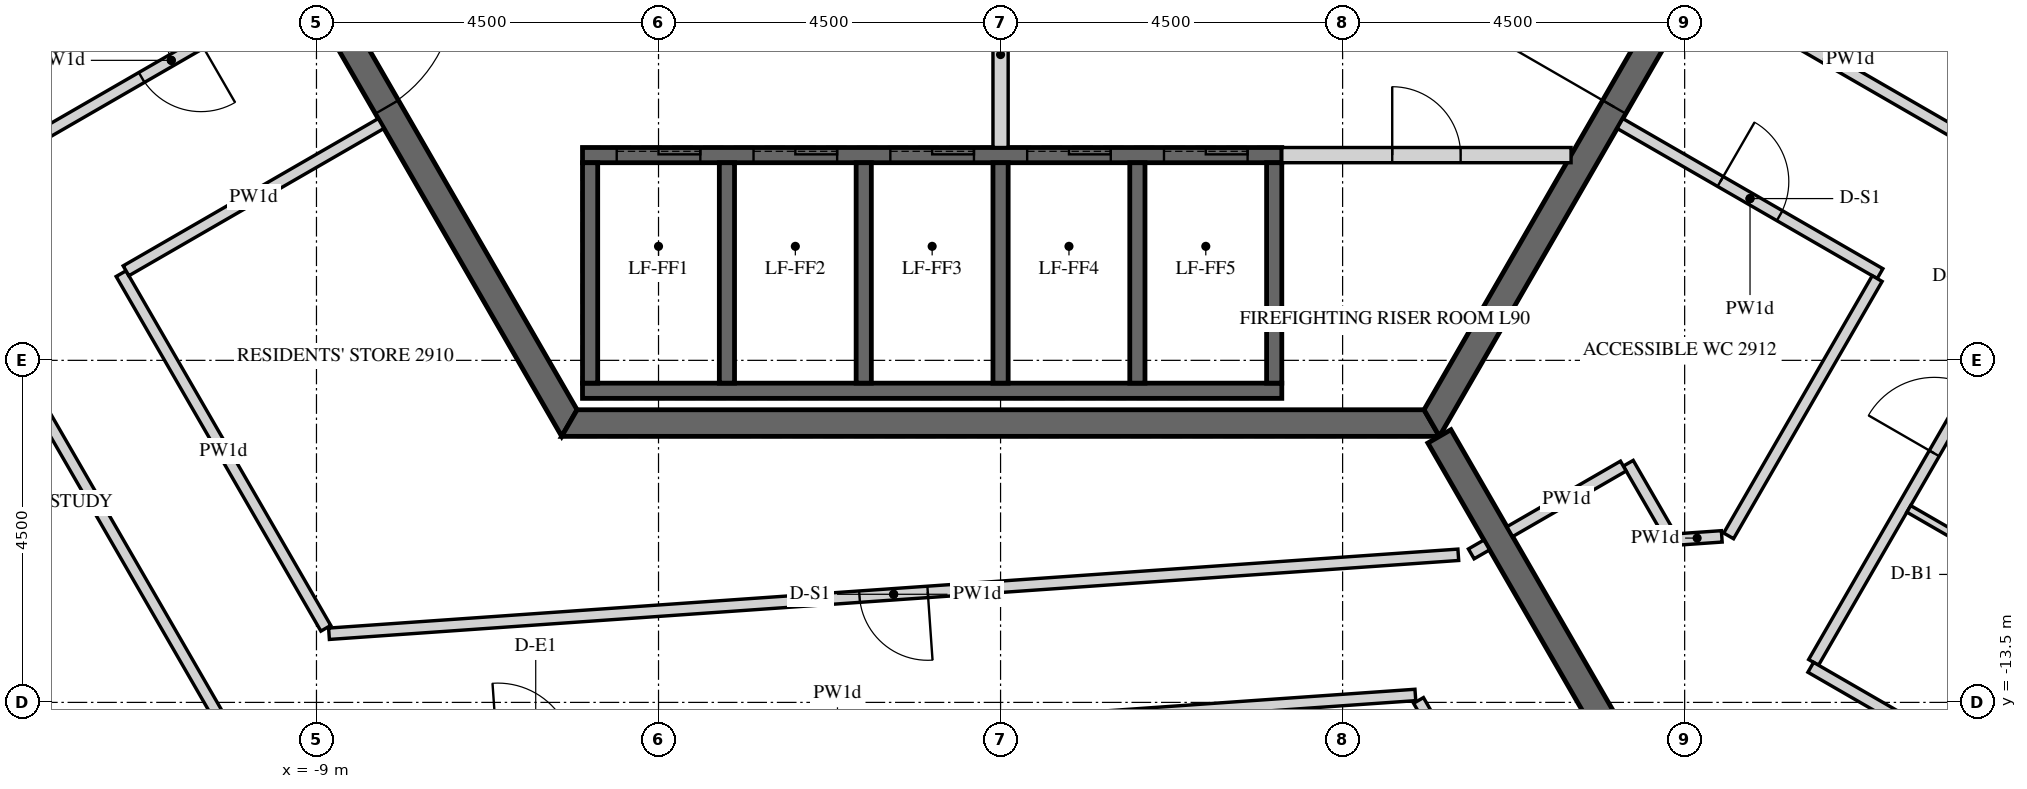
"""IFC4 building model, lengths in metres.
Left out: names, types, materials, properties, quantities, classifications, styles, units other than length and angle.
Written with IfcOpenShell. Run it as: python <this file> out.ifc"""

import sys

from ifc_helpers import new_model, si_unit, direction, frame, frame_2d, origin, place, context, subcontext, project, spatial, polyline, rectangle, outline, extrude, element, fill, save


model = new_model("IFC4")
c1 = context("Model", 3, precision=1e-05, world=origin(), true_north=direction((0.0, 1.0)))
c2 = subcontext(c1, "Body", "Model", "MODEL_VIEW")
j1 = project(units=[si_unit("LENGTHUNIT", "METRE"), si_unit("PLANEANGLEUNIT", "RADIAN")], contexts=[c1])
p1 = place(None, origin())
s1 = spatial("IfcSite", under=j1, at=p1, CompositionType="ELEMENT")
p2 = place(p1, origin())
s2 = spatial("IfcBuilding", under=s1, at=p2, CompositionType="ELEMENT")
p3 = place(p2, frame((0.0, 0.0, 372.9)))
s3 = spatial("IfcBuildingStorey", under=s2, at=p3, CompositionType="ELEMENT", Elevation=372.9)
p4 = place(p3, frame((-11.345, 0.0, -0.15), z_axis=(0.0, 0.0, 1.0), x_axis=(0.499995046907, -0.866028263435, 0.0)))
e1 = element("IfcWall", 1, at=p4, inside=s3, PredefinedType="SHEAR", context=c2, shape_type="SweptSolid", body=[
    extrude(outline(polyline([(-0.101, -0.175), (11.446, -0.175), (11.244, 0.175), (0.101, 0.175), (-0.101, -0.175)])), origin(), (0.0, 0.0, 1.0), 3.55),
])
p5 = place(p4, frame((4.744, 0.0, 0.15)))
e2 = element("IfcOpeningElement", 2, at=p5, cuts=e1, PredefinedType="OPENING", context=c2, shape_type="SweptSolid", body=[
    extrude(rectangle(XDim=1.8, YDim=2.4, at=frame_2d((0.9, 1.2))), frame((0.0, 0.185, 0.0), z_axis=(0.0, -1.0, 0.0), x_axis=(1.0, 0.0, 0.0)), (0.0, 0.0, 1.0), 0.37),
])
p6 = place(p3, frame((-5.673, -9.825, -0.15), z_axis=(0.0, 0.0, 1.0), x_axis=(1.0, 0.0, 0.0)))
e3 = element("IfcWall", 3, at=p6, inside=s3, PredefinedType="SHEAR", context=c2, shape_type="SweptSolid", body=[
    extrude(outline(polyline([(-0.101, -0.175), (11.446, -0.175), (11.244, 0.175), (0.101, 0.175), (-0.101, -0.175)])), origin(), (0.0, 0.0, 1.0), 3.55),
])
p7 = place(p3, frame((5.673, -9.825, -0.15), z_axis=(0.0, 0.0, 1.0), x_axis=(0.499995046907, 0.866028263435, 0.0)))
e4 = element("IfcWall", 4, at=p7, inside=s3, PredefinedType="SHEAR", context=c2, shape_type="SweptSolid", body=[
    extrude(outline(polyline([(-0.101, -0.175), (11.446, -0.175), (11.244, 0.175), (0.101, 0.175), (-0.101, -0.175)])), origin(), (0.0, 0.0, 1.0), 3.55),
])
p8 = place(p7, frame((4.801, 0.0, 0.15)))
e5 = element("IfcOpeningElement", 5, at=p8, cuts=e4, PredefinedType="OPENING", context=c2, shape_type="SweptSolid", body=[
    extrude(rectangle(XDim=1.8, YDim=2.4, at=frame_2d((0.9, 1.2))), frame((0.0, 0.185, 0.0), z_axis=(0.0, -1.0, 0.0), x_axis=(1.0, 0.0, 0.0)), (0.0, 0.0, 1.0), 0.37),
])
p9 = place(p3, frame((5.773, -10.0, -0.15), z_axis=(0.0, 0.0, 1.0), x_axis=(0.500007911273, -0.866020836161, 0.0)))
e6 = element("IfcWall", 6, at=p9, inside=s3, PredefinedType="SHEAR", context=c2, shape_type="SweptSolid", body=[
    extrude(rectangle(XDim=14.51, YDim=0.35, at=frame_2d((7.255, 0.0))), origin(), (0.0, 0.0, 1.0), 3.55),
])
p10 = place(p9, frame((6.355, 0.0, 0.15)))
e7 = element("IfcOpeningElement", 7, at=p10, cuts=e6, PredefinedType="OPENING", context=c2, shape_type="SweptSolid", body=[
    extrude(rectangle(XDim=1.8, YDim=2.4, at=frame_2d((0.9, 1.2))), frame((0.0, 0.185, 0.0), z_axis=(0.0, -1.0, 0.0), x_axis=(1.0, 0.0, 0.0)), (0.0, 0.0, 1.0), 0.37),
])
p11 = place(p3, frame((-5.5, -6.3, -0.25), z_axis=(0.0, 0.0, 1.0), x_axis=(1.0, 0.0, 0.0)))
e8 = element("IfcWall", 8, at=p11, inside=s3, PredefinedType="SHEAR", context=c2, shape_type="SweptSolid", body=[
    extrude(rectangle(XDim=9.2, YDim=0.2, at=frame_2d((4.6, 0.0))), origin(), (0.0, 0.0, 1.0), 3.9),
])
p12 = place(p11, frame((0.45, 0.0, 0.25)))
e9 = element("IfcOpeningElement", 9, at=p12, cuts=e8, PredefinedType="OPENING", context=c2, shape_type="SweptSolid", body=[
    extrude(rectangle(XDim=1.1, YDim=2.1, at=frame_2d((0.55, 1.05))), frame((0.0, 0.11, 0.0), z_axis=(0.0, -1.0, 0.0), x_axis=(1.0, 0.0, 0.0)), (0.0, 0.0, 1.0), 0.22),
])
p13 = place(p11, frame((2.25, 0.0, 0.25)))
e10 = element("IfcOpeningElement", 10, at=p13, cuts=e8, PredefinedType="OPENING", context=c2, shape_type="SweptSolid", body=[
    extrude(rectangle(XDim=1.1, YDim=2.1, at=frame_2d((0.55, 1.05))), frame((0.0, 0.11, 0.0), z_axis=(0.0, -1.0, 0.0), x_axis=(1.0, 0.0, 0.0)), (0.0, 0.0, 1.0), 0.22),
])
p14 = place(p11, frame((4.05, 0.0, 0.25)))
e11 = element("IfcOpeningElement", 11, at=p14, cuts=e8, PredefinedType="OPENING", context=c2, shape_type="SweptSolid", body=[
    extrude(rectangle(XDim=1.1, YDim=2.1, at=frame_2d((0.55, 1.05))), frame((0.0, 0.11, 0.0), z_axis=(0.0, -1.0, 0.0), x_axis=(1.0, 0.0, 0.0)), (0.0, 0.0, 1.0), 0.22),
])
p15 = place(p11, frame((5.85, 0.0, 0.25)))
e12 = element("IfcOpeningElement", 12, at=p15, cuts=e8, PredefinedType="OPENING", context=c2, shape_type="SweptSolid", body=[
    extrude(rectangle(XDim=1.1, YDim=2.1, at=frame_2d((0.55, 1.05))), frame((0.0, 0.11, 0.0), z_axis=(0.0, -1.0, 0.0), x_axis=(1.0, 0.0, 0.0)), (0.0, 0.0, 1.0), 0.22),
])
p16 = place(p11, frame((7.65, 0.0, 0.25)))
e13 = element("IfcOpeningElement", 13, at=p16, cuts=e8, PredefinedType="OPENING", context=c2, shape_type="SweptSolid", body=[
    extrude(rectangle(XDim=1.1, YDim=2.1, at=frame_2d((0.55, 1.05))), frame((0.0, 0.11, 0.0), z_axis=(0.0, -1.0, 0.0), x_axis=(1.0, 0.0, 0.0)), (0.0, 0.0, 1.0), 0.22),
])
p17 = place(p3, frame((-5.5, -9.4, -0.25), z_axis=(0.0, 0.0, 1.0), x_axis=(1.0, 0.0, 0.0)))
e14 = element("IfcWall", 14, at=p17, inside=s3, PredefinedType="SHEAR", context=c2, shape_type="SweptSolid", body=[
    extrude(rectangle(XDim=9.2, YDim=0.2, at=frame_2d((4.6, 0.0))), origin(), (0.0, 0.0, 1.0), 3.9),
])
for number, where, z_axis, x_axis in (
    (15, (-5.4, -9.3, -0.25), (0.0, 0.0, 1.0), (0.0, 1.0, 0.0)),
    (16, (-3.6, -9.3, -0.25), (0.0, 0.0, 1.0), (0.0, 1.0, 0.0)),
    (17, (-1.8, -9.3, -0.25), (0.0, 0.0, 1.0), (0.0, 1.0, 0.0)),
    (18, (0.0, -9.3, -0.25), (0.0, 0.0, 1.0), (0.0, 1.0, 0.0)),
    (19, (1.8, -9.3, -0.25), (0.0, 0.0, 1.0), (0.0, 1.0, 0.0)),
    (20, (3.6, -9.3, -0.25), (0.0, 0.0, 1.0), (0.0, 1.0, 0.0)),
):
    element("IfcWall", number, at=place(p3, frame(where, z_axis=z_axis, x_axis=x_axis)), inside=s3, PredefinedType="SHEAR", context=c2, shape_type="SweptSolid", body=[
        extrude(rectangle(XDim=2.9, YDim=0.2, at=frame_2d((1.45, 0.0))), origin(), (0.0, 0.0, 1.0), 3.9),
    ])
p18 = place(p3, frame((0.0, -6.2, 0.0), z_axis=(0.0, 0.0, 1.0), x_axis=(0.0, 1.0, 0.0)))
e21 = element("IfcWall", 21, at=p18, inside=s3, PredefinedType="PARTITIONING", context=c2, shape_type="SweptSolid", body=[
    extrude(rectangle(XDim=6.1, YDim=0.2, at=frame_2d((3.05, 0.0))), origin(), (0.0, 0.0, 1.0), 3.65),
])
p19 = place(p3, frame((3.7, -6.3, 0.0), z_axis=(0.0, 0.0, 1.0), x_axis=(1.0, 0.0, 0.0)))
e22 = element("IfcWall", 22, at=p19, inside=s3, PredefinedType="PARTITIONING", context=c2, shape_type="SweptSolid", body=[
    extrude(rectangle(XDim=3.806, YDim=0.2, at=frame_2d((1.903, 0.0))), origin(), (0.0, 0.0, 1.0), 3.65),
])
p20 = place(p19, frame((1.453, 0.0, 0.0)))
e23 = element("IfcOpeningElement", 23, at=p20, cuts=e22, PredefinedType="OPENING", context=c2, shape_type="SweptSolid", body=[
    extrude(rectangle(XDim=0.9, YDim=2.1, at=frame_2d((0.45, 1.05))), frame((0.0, 0.11, 0.0), z_axis=(0.0, -1.0, 0.0), x_axis=(1.0, 0.0, 0.0)), (0.0, 0.0, 1.0), 0.22),
])
p21 = place(p3, frame((-16.583, -2.777, 0.0), z_axis=(0.0, 0.0, 1.0), x_axis=(0.50000467473, -0.866022704811, 0.0)))
e24 = element("IfcWall", 24, at=p21, inside=s3, PredefinedType="PARTITIONING", context=c2, shape_type="SweptSolid", body=[
    extrude(rectangle(XDim=13.504, YDim=0.15, at=frame_2d((6.752, 0.0))), origin(), (0.0, 0.0, 1.0), 2.47),
])
p22 = place(p21, frame((0.925, 0.0, 0.0)))
e25 = element("IfcOpeningElement", 25, at=p22, cuts=e24, PredefinedType="OPENING", context=c2, shape_type="SweptSolid", body=[
    extrude(rectangle(XDim=1.0, YDim=2.1, at=frame_2d((0.5, 1.05))), frame((0.0, 0.085, 0.0), z_axis=(0.0, -1.0, 0.0), x_axis=(1.0, 0.0, 0.0)), (0.0, 0.0, 1.0), 0.17),
])
p23 = place(p3, frame((-9.749, -14.465, 0.0), z_axis=(0.0, 0.0, 1.0), x_axis=(0.997564252773, 0.069753577612, 0.0)))
e26 = element("IfcWall", 26, at=p23, inside=s3, PredefinedType="PARTITIONING", context=c2, shape_type="SweptSolid", body=[
    extrude(rectangle(XDim=15.243, YDim=0.15, at=frame_2d((7.621, 0.0))), origin(), (0.0, 0.0, 1.0), 2.47),
])
p24 = place(p23, frame((3.142, 0.0, 0.0)))
e27 = element("IfcOpeningElement", 27, at=p24, cuts=e26, PredefinedType="OPENING", context=c2, shape_type="SweptSolid", body=[
    extrude(rectangle(XDim=1.0, YDim=2.1, at=frame_2d((0.5, 1.05))), frame((0.0, 0.085, 0.0), z_axis=(0.0, -1.0, 0.0), x_axis=(1.0, 0.0, 0.0)), (0.0, 0.0, 1.0), 0.17),
])
p25 = place(p3, frame((5.499, -13.474, 0.0), z_axis=(0.0, 0.0, 1.0), x_axis=(0.500002592159, -0.866023907196, 0.0)))
e28 = element("IfcWall", 28, at=p25, inside=s3, PredefinedType="PARTITIONING", context=c2, shape_type="SweptSolid", body=[
    extrude(rectangle(XDim=5.784, YDim=0.15, at=frame_2d((2.892, 0.0))), origin(), (0.0, 0.0, 1.0), 2.47),
])
p26 = place(p3, frame((-9.2, -4.066, 0.0), z_axis=(0.0, 0.0, 1.0), x_axis=(-0.866020906874, -0.500007788796, 0.0)))
e29 = element("IfcWall", 29, at=p26, inside=s3, PredefinedType="PARTITIONING", context=c2, shape_type="SweptSolid", body=[
    extrude(rectangle(XDim=3.95, YDim=0.15, at=frame_2d((1.975, 0.0))), origin(), (0.0, 0.0, 1.0), 2.47),
])
p27 = place(p26, frame((1.525, 0.0, 0.0)))
e30 = element("IfcOpeningElement", 30, at=p27, cuts=e29, PredefinedType="OPENING", context=c2, shape_type="SweptSolid", body=[
    extrude(rectangle(XDim=0.9, YDim=2.1, at=frame_2d((0.45, 1.05))), frame((0.0, 0.085, 0.0), z_axis=(0.0, -1.0, 0.0), x_axis=(1.0, 0.0, 0.0)), (0.0, 0.0, 1.0), 0.17),
])
p28 = place(p3, frame((6.396, -11.429, 0.0), z_axis=(0.0, 0.0, 1.0), x_axis=(-0.866254745882, -0.499602557277, 0.0)))
e31 = element("IfcWall", 31, at=p28, inside=s3, PredefinedType="PARTITIONING", context=c2, shape_type="SweptSolid", body=[
    extrude(rectangle(XDim=0.235, YDim=0.15, at=frame_2d((0.118, 0.0))), origin(), (0.0, 0.0, 1.0), 2.47),
])
p29 = place(p3, frame((6.022, -11.558, 0.0), z_axis=(0.0, 0.0, 1.0), x_axis=(-0.997564502115, -0.06975001161, 0.0)))
e32 = element("IfcWall", 32, at=p29, inside=s3, PredefinedType="PARTITIONING", context=c2, shape_type="SweptSolid", body=[
    extrude(rectangle(XDim=14.894, YDim=0.15, at=frame_2d((7.447, 0.0))), origin(), (0.0, 0.0, 1.0), 2.47),
])
p30 = place(p29, frame((6.997, 0.0, 0.0)))
e33 = element("IfcOpeningElement", 33, at=p30, cuts=e32, PredefinedType="OPENING", context=c2, shape_type="SweptSolid", body=[
    extrude(rectangle(XDim=0.9, YDim=2.1, at=frame_2d((0.45, 1.05))), frame((0.0, 0.085, 0.0), z_axis=(0.0, -1.0, 0.0), x_axis=(1.0, 0.0, 0.0)), (0.0, 0.0, 1.0), 0.17),
])
p31 = place(p3, frame((-8.877, -12.525, 0.0), z_axis=(0.0, 0.0, 1.0), x_axis=(-0.500014061761, 0.866017285071, 0.0)))
e34 = element("IfcWall", 34, at=p31, inside=s3, PredefinedType="PARTITIONING", context=c2, shape_type="SweptSolid", body=[
    extrude(rectangle(XDim=5.387, YDim=0.15, at=frame_2d((2.693, 0.0))), origin(), (0.0, 0.0, 1.0), 2.47),
])
p32 = place(p3, frame((-11.506, -7.822, 0.0), z_axis=(0.0, 0.0, 1.0), x_axis=(0.866032409438, 0.499987865656, 0.0)))
e35 = element("IfcWall", 35, at=p32, inside=s3, PredefinedType="PARTITIONING", context=c2, shape_type="SweptSolid", body=[
    extrude(rectangle(XDim=3.875, YDim=0.15, at=frame_2d((1.938, 0.0))), origin(), (0.0, 0.0, 1.0), 2.47),
])
p33 = place(p3, frame((10.697, -12.973, 0.0), z_axis=(0.0, 0.0, 1.0), x_axis=(0.499991115059, 0.866030533446, 0.0)))
e36 = element("IfcWall", 36, at=p33, inside=s3, PredefinedType="PARTITIONING", context=c2, shape_type="SweptSolid", body=[
    extrude(rectangle(XDim=13.504, YDim=0.15, at=frame_2d((6.752, 0.0))), origin(), (0.0, 0.0, 1.0), 2.47),
])
p34 = place(p33, frame((3.175, 0.0, 0.0)))
e37 = element("IfcOpeningElement", 37, at=p34, cuts=e36, PredefinedType="OPENING", context=c2, shape_type="SweptSolid", body=[
    extrude(rectangle(XDim=1.0, YDim=2.1, at=frame_2d((0.5, 1.05))), frame((0.0, 0.085, 0.0), z_axis=(0.0, -1.0, 0.0), x_axis=(1.0, 0.0, 0.0)), (0.0, 0.0, 1.0), 0.17),
])
p35 = place(p3, frame((13.777, -14.838, 0.0), z_axis=(0.0, 0.0, 1.0), x_axis=(-0.866047807691, 0.499961193289, 0.0)))
e38 = element("IfcWall", 38, at=p35, inside=s3, PredefinedType="PARTITIONING", context=c2, shape_type="SweptSolid", body=[
    extrude(rectangle(XDim=3.6, YDim=0.15, at=frame_2d((1.8, 0.0))), origin(), (0.0, 0.0, 1.0), 2.47),
])
p36 = place(p3, frame((12.555, -6.003, 0.0), z_axis=(0.0, 0.0, 1.0), x_axis=(-0.866016658288, 0.500015147339, 0.0)))
e39 = element("IfcWall", 39, at=p36, inside=s3, PredefinedType="PARTITIONING", context=c2, shape_type="SweptSolid", body=[
    extrude(rectangle(XDim=3.875, YDim=0.15, at=frame_2d((1.938, 0.0))), origin(), (0.0, 0.0, 1.0), 2.47),
])
p37 = place(p3, frame((8.15, -5.884, 0.0), z_axis=(0.0, 0.0, 1.0), x_axis=(0.866020906874, -0.500007788796, 0.0)))
e40 = element("IfcWall", 40, at=p37, inside=s3, PredefinedType="PARTITIONING", context=c2, shape_type="SweptSolid", body=[
    extrude(rectangle(XDim=3.95, YDim=0.15, at=frame_2d((1.975, 0.0))), origin(), (0.0, 0.0, 1.0), 2.47),
])
p38 = place(p37, frame((1.525, 0.0, 0.0)))
e41 = element("IfcOpeningElement", 41, at=p38, cuts=e40, PredefinedType="OPENING", context=c2, shape_type="SweptSolid", body=[
    extrude(rectangle(XDim=0.9, YDim=2.1, at=frame_2d((0.45, 1.05))), frame((0.0, 0.085, 0.0), z_axis=(0.0, -1.0, 0.0), x_axis=(1.0, 0.0, 0.0)), (0.0, 0.0, 1.0), 0.17),
])
p39 = place(p3, frame((11.533, -7.924, 0.0), z_axis=(0.0, 0.0, 1.0), x_axis=(-0.500001804394, -0.866024362014, 0.0)))
e42 = element("IfcWall", 42, at=p39, inside=s3, PredefinedType="PARTITIONING", context=c2, shape_type="SweptSolid", body=[
    extrude(rectangle(XDim=3.909, YDim=0.15, at=frame_2d((1.954, 0.0))), origin(), (0.0, 0.0, 1.0), 2.47),
])
p40 = place(p3, frame((9.488, -11.316, 0.0), z_axis=(0.0, 0.0, 1.0), x_axis=(-0.997556873667, -0.06985902805, 0.0)))
e43 = element("IfcWall", 43, at=p40, inside=s3, PredefinedType="PARTITIONING", context=c2, shape_type="SweptSolid", body=[
    extrude(rectangle(XDim=0.65, YDim=0.15, at=frame_2d((0.325, 0.0))), origin(), (0.0, 0.0, 1.0), 2.47),
])
p41 = place(p3, frame((8.798, -11.289, 0.0), z_axis=(0.0, 0.0, 1.0), x_axis=(-0.499859449273, 0.866106535579, 0.0)))
e44 = element("IfcWall", 44, at=p41, inside=s3, PredefinedType="PARTITIONING", context=c2, shape_type="SweptSolid", body=[
    extrude(rectangle(XDim=1.08, YDim=0.15, at=frame_2d((0.54, 0.0))), origin(), (0.0, 0.0, 1.0), 2.47),
])
p42 = place(p3, frame((8.193, -10.391, 0.0), z_axis=(0.0, 0.0, 1.0), x_axis=(-0.866013532718, -0.500020560727, 0.0)))
e45 = element("IfcWall", 45, at=p42, inside=s3, PredefinedType="PARTITIONING", context=c2, shape_type="SweptSolid", body=[
    extrude(rectangle(XDim=1.725, YDim=0.15, at=frame_2d((0.863, 0.0))), origin(), (0.0, 0.0, 1.0), 2.47),
])
p43 = place(p3, frame((11.949, -10.954, 0.0), z_axis=(0.0, 0.0, 1.0), x_axis=(0.866001044215, -0.500042189638, 0.0)))
e46 = element("IfcWall", 46, at=p43, inside=s3, PredefinedType="PARTITIONING", context=c2, shape_type="SweptSolid", body=[
    extrude(rectangle(XDim=3.525, YDim=0.1, at=frame_2d((1.763, 0.0))), origin(), (0.0, 0.0, 1.0), 2.47),
])
p44 = place(p43, frame((1.325, 0.0, 0.0)))
e47 = element("IfcOpeningElement", 47, at=p44, cuts=e46, PredefinedType="OPENING", context=c2, shape_type="SweptSolid", body=[
    extrude(rectangle(XDim=0.8, YDim=2.1, at=frame_2d((0.4, 1.05))), frame((0.0, 0.06, 0.0), z_axis=(0.0, -1.0, 0.0), x_axis=(1.0, 0.0, 0.0)), (0.0, 0.0, 1.0), 0.12),
])
p45 = place(p5, origin())
e48 = element("IfcDoor", 48, at=p45, inside=s3, OperationType="DOUBLE_DOOR_SINGLE_SWING", PredefinedType="DOOR", context=c2, shape_type="SweptSolid", body=[
    extrude(rectangle(XDim=1.8, YDim=2.4, at=frame_2d((0.9, 1.2))), frame((0.0, 0.025, 0.0), z_axis=(0.0, -1.0, 0.0), x_axis=(1.0, 0.0, 0.0)), (0.0, 0.0, 1.0), 0.05),
])
fill(e2, e48)
p46 = place(p8, origin())
e49 = element("IfcDoor", 49, at=p46, inside=s3, OperationType="DOUBLE_DOOR_SINGLE_SWING", PredefinedType="DOOR", context=c2, shape_type="SweptSolid", body=[
    extrude(rectangle(XDim=1.8, YDim=2.4, at=frame_2d((0.9, 1.2))), frame((0.0, 0.025, 0.0), z_axis=(0.0, -1.0, 0.0), x_axis=(1.0, 0.0, 0.0)), (0.0, 0.0, 1.0), 0.05),
])
fill(e5, e49)
p47 = place(p20, origin())
e50 = element("IfcDoor", 50, at=p47, inside=s3, OperationType="SINGLE_SWING_LEFT", PredefinedType="DOOR", context=c2, shape_type="SweptSolid", body=[
    extrude(rectangle(XDim=0.9, YDim=2.1, at=frame_2d((0.45, 1.05))), frame((0.0, 0.025, 0.0), z_axis=(0.0, -1.0, 0.0), x_axis=(1.0, 0.0, 0.0)), (0.0, 0.0, 1.0), 0.05),
])
fill(e23, e50)
p48 = place(p12, origin())
e51 = element("IfcDoor", 51, at=p48, inside=s3, OperationType="SLIDING_TO_LEFT", PredefinedType="DOOR", context=c2, shape_type="SweptSolid", body=[
    extrude(rectangle(XDim=1.1, YDim=2.1, at=frame_2d((0.55, 1.05))), frame((0.0, 0.025, 0.0), z_axis=(0.0, -1.0, 0.0), x_axis=(1.0, 0.0, 0.0)), (0.0, 0.0, 1.0), 0.05),
])
fill(e9, e51)
p49 = place(p13, origin())
e52 = element("IfcDoor", 52, at=p49, inside=s3, OperationType="SLIDING_TO_LEFT", PredefinedType="DOOR", context=c2, shape_type="SweptSolid", body=[
    extrude(rectangle(XDim=1.1, YDim=2.1, at=frame_2d((0.55, 1.05))), frame((0.0, 0.025, 0.0), z_axis=(0.0, -1.0, 0.0), x_axis=(1.0, 0.0, 0.0)), (0.0, 0.0, 1.0), 0.05),
])
fill(e10, e52)
p50 = place(p14, origin())
e53 = element("IfcDoor", 53, at=p50, inside=s3, OperationType="SLIDING_TO_LEFT", PredefinedType="DOOR", context=c2, shape_type="SweptSolid", body=[
    extrude(rectangle(XDim=1.1, YDim=2.1, at=frame_2d((0.55, 1.05))), frame((0.0, 0.025, 0.0), z_axis=(0.0, -1.0, 0.0), x_axis=(1.0, 0.0, 0.0)), (0.0, 0.0, 1.0), 0.05),
])
fill(e11, e53)
p51 = place(p15, origin())
e54 = element("IfcDoor", 54, at=p51, inside=s3, OperationType="SLIDING_TO_LEFT", PredefinedType="DOOR", context=c2, shape_type="SweptSolid", body=[
    extrude(rectangle(XDim=1.1, YDim=2.1, at=frame_2d((0.55, 1.05))), frame((0.0, 0.025, 0.0), z_axis=(0.0, -1.0, 0.0), x_axis=(1.0, 0.0, 0.0)), (0.0, 0.0, 1.0), 0.05),
])
fill(e12, e54)
p52 = place(p16, origin())
e55 = element("IfcDoor", 55, at=p52, inside=s3, OperationType="SLIDING_TO_LEFT", PredefinedType="DOOR", context=c2, shape_type="SweptSolid", body=[
    extrude(rectangle(XDim=1.1, YDim=2.1, at=frame_2d((0.55, 1.05))), frame((0.0, 0.025, 0.0), z_axis=(0.0, -1.0, 0.0), x_axis=(1.0, 0.0, 0.0)), (0.0, 0.0, 1.0), 0.05),
])
fill(e13, e55)
p53 = place(p34, origin())
e56 = element("IfcDoor", 56, at=p53, inside=s3, OperationType="SINGLE_SWING_LEFT", PredefinedType="DOOR", context=c2, shape_type="SweptSolid", body=[
    extrude(rectangle(XDim=1.0, YDim=2.1, at=frame_2d((0.5, 1.05))), frame((0.0, 0.025, 0.0), z_axis=(0.0, -1.0, 0.0), x_axis=(1.0, 0.0, 0.0)), (0.0, 0.0, 1.0), 0.05),
])
fill(e37, e56)
p54 = place(p27, origin())
e57 = element("IfcDoor", 57, at=p54, inside=s3, OperationType="SINGLE_SWING_LEFT", PredefinedType="DOOR", context=c2, shape_type="SweptSolid", body=[
    extrude(rectangle(XDim=0.9, YDim=2.1, at=frame_2d((0.45, 1.05))), frame((0.0, 0.025, 0.0), z_axis=(0.0, -1.0, 0.0), x_axis=(1.0, 0.0, 0.0)), (0.0, 0.0, 1.0), 0.05),
])
fill(e30, e57)
p55 = place(p30, origin())
e58 = element("IfcDoor", 58, at=p55, inside=s3, OperationType="SINGLE_SWING_RIGHT", PredefinedType="DOOR", context=c2, shape_type="SweptSolid", body=[
    extrude(rectangle(XDim=0.9, YDim=2.1, at=frame_2d((0.45, 1.05))), frame((0.0, 0.025, 0.0), z_axis=(0.0, -1.0, 0.0), x_axis=(1.0, 0.0, 0.0)), (0.0, 0.0, 1.0), 0.05),
])
fill(e33, e58)
p56 = place(p38, origin())
e59 = element("IfcDoor", 59, at=p56, inside=s3, OperationType="SINGLE_SWING_LEFT", PredefinedType="DOOR", context=c2, shape_type="SweptSolid", body=[
    extrude(rectangle(XDim=0.9, YDim=2.1, at=frame_2d((0.45, 1.05))), frame((0.0, 0.025, 0.0), z_axis=(0.0, -1.0, 0.0), x_axis=(1.0, 0.0, 0.0)), (0.0, 0.0, 1.0), 0.05),
])
fill(e41, e59)
save(model, sys.argv[1])
